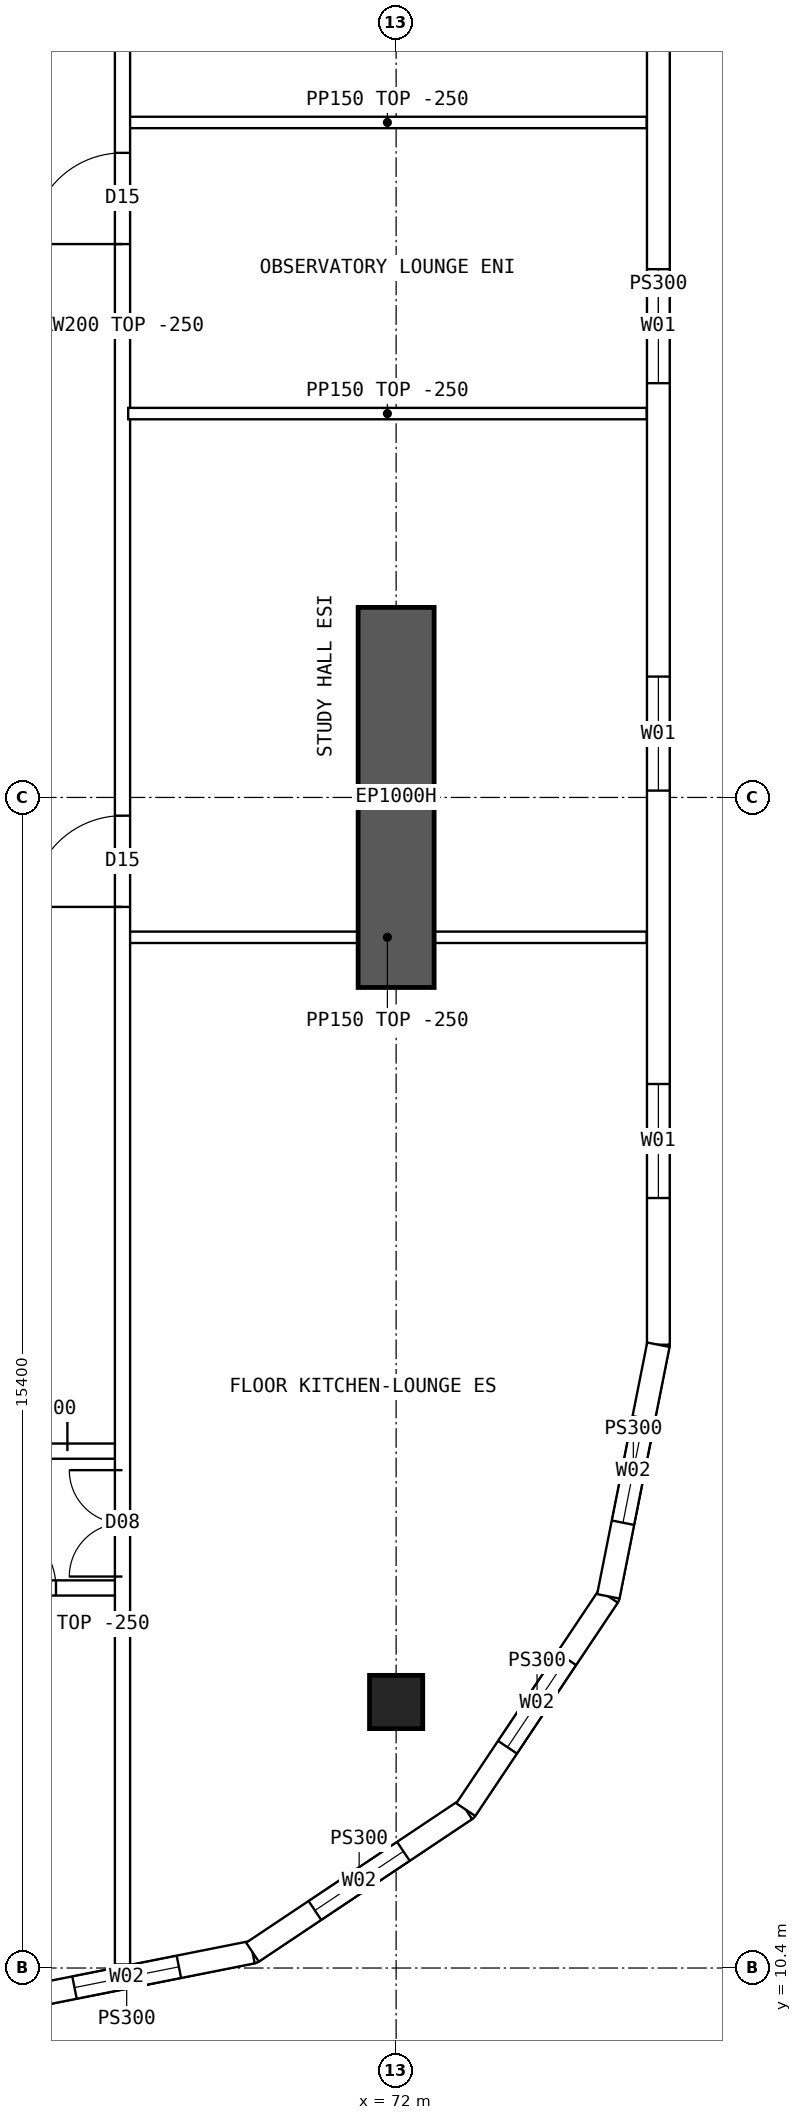
"""IFC4 building model, lengths in metres.
Left out: names, types, materials, properties, quantities, classifications, styles, units other than length and angle.
Written with IfcOpenShell. Run it as: python <this file> out.ifc"""

import sys

from ifc_helpers import new_model, si_unit, direction, frame, frame_2d, origin, origin_2d, place, context, subcontext, project, spatial, polyline, rectangle, hollow_rectangle, outline, extrude, element, fill, save


model = new_model("IFC4")
c1 = context("Model", 3, precision=1e-05, world=origin(), true_north=direction((0.0, 1.0)))
c2 = subcontext(c1, "Body", "Model", "MODEL_VIEW")
j1 = project(units=[si_unit("LENGTHUNIT", "METRE"), si_unit("PLANEANGLEUNIT", "RADIAN")], contexts=[c1])
p1 = place(None, origin())
s1 = spatial("IfcSite", under=j1, at=p1, CompositionType="ELEMENT")
p2 = place(p1, origin())
s2 = spatial("IfcBuilding", under=s1, at=p2, CompositionType="ELEMENT")
p3 = place(p2, frame((0.0, 0.0, 163.6)))
s3 = spatial("IfcBuildingStorey", under=s2, at=p3, CompositionType="ELEMENT", Elevation=163.6)
p4 = place(p3, frame((72.0, 13.9, 0.0), z_axis=(0.0, 0.0, 1.0), x_axis=(1.0, 0.0, 0.0)))
e1 = element("IfcColumn", 1, at=p4, inside=s3, PredefinedType="COLUMN", context=c2, shape_type="SweptSolid", body=[
    extrude(hollow_rectangle(XDim=0.7, YDim=0.7, WallThickness=0.07, at=origin_2d()), origin(), (0.0, 0.0, 1.0), 3.75),
])
p5 = place(p3, frame((72.0, 23.3, 0.0), z_axis=(0.0, 0.0, 1.0), x_axis=(0.0, 1.0, 0.0)))
e2 = element("IfcWall", 2, at=p5, inside=s3, PredefinedType="SHEAR", context=c2, shape_type="SweptSolid", body=[
    extrude(rectangle(XDim=5.0, YDim=1.0, at=frame_2d((2.5, 0.0))), origin(), (0.0, 0.0, 1.0), 3.75),
])
p6 = place(p3, frame((75.45, 18.6, 0.0), z_axis=(0.0, 0.0, 1.0), x_axis=(0.0, 1.0, 0.0)))
e3 = element("IfcWall", 3, at=p6, inside=s3, PredefinedType="SOLIDWALL", context=c2, shape_type="SweptSolid", body=[
    extrude(outline(polyline([(-0.015, -0.15), (26.815, -0.15), (26.785, 0.15), (0.015, 0.15), (-0.015, -0.15)])), origin(), (0.0, 0.0, 1.0), 3.5),
])
p7 = place(p6, frame((1.93, 0.0, 0.9)))
e4 = element("IfcOpeningElement", 4, at=p7, cuts=e3, PredefinedType="OPENING", context=c2, shape_type="SweptSolid", body=[
    extrude(rectangle(XDim=1.5, YDim=2.0, at=frame_2d((0.75, 1.0))), frame((0.0, 0.16, 0.0), z_axis=(0.0, -1.0, 0.0), x_axis=(1.0, 0.0, 0.0)), (0.0, 0.0, 1.0), 0.32),
])
p8 = place(p6, frame((7.29, 0.0, 0.9)))
e5 = element("IfcOpeningElement", 5, at=p8, cuts=e3, PredefinedType="OPENING", context=c2, shape_type="SweptSolid", body=[
    extrude(rectangle(XDim=1.5, YDim=2.0, at=frame_2d((0.75, 1.0))), frame((0.0, 0.16, 0.0), z_axis=(0.0, -1.0, 0.0), x_axis=(1.0, 0.0, 0.0)), (0.0, 0.0, 1.0), 0.32),
])
p9 = place(p6, frame((12.65, 0.0, 0.9)))
e6 = element("IfcOpeningElement", 6, at=p9, cuts=e3, PredefinedType="OPENING", context=c2, shape_type="SweptSolid", body=[
    extrude(rectangle(XDim=1.5, YDim=2.0, at=frame_2d((0.75, 1.0))), frame((0.0, 0.16, 0.0), z_axis=(0.0, -1.0, 0.0), x_axis=(1.0, 0.0, 0.0)), (0.0, 0.0, 1.0), 0.32),
])
p10 = place(p6, frame((18.01, 0.0, 0.9)))
e7 = element("IfcOpeningElement", 7, at=p10, cuts=e3, PredefinedType="OPENING", context=c2, shape_type="SweptSolid", body=[
    extrude(rectangle(XDim=1.5, YDim=2.0, at=frame_2d((0.75, 1.0))), frame((0.0, 0.16, 0.0), z_axis=(0.0, -1.0, 0.0), x_axis=(1.0, 0.0, 0.0)), (0.0, 0.0, 1.0), 0.32),
])
p11 = place(p6, frame((23.37, 0.0, 0.9)))
e8 = element("IfcOpeningElement", 8, at=p11, cuts=e3, PredefinedType="OPENING", context=c2, shape_type="SweptSolid", body=[
    extrude(rectangle(XDim=1.5, YDim=2.0, at=frame_2d((0.75, 1.0))), frame((0.0, 0.16, 0.0), z_axis=(0.0, -1.0, 0.0), x_axis=(1.0, 0.0, 0.0)), (0.0, 0.0, 1.0), 0.32),
])
p12 = place(p3, frame((66.8, 9.95, 0.0), z_axis=(0.0, 0.0, 1.0), x_axis=(0.98078325777, 0.195100490205, 0.0)))
e9 = element("IfcWall", 9, at=p12, inside=s3, PredefinedType="SOLIDWALL", context=c2, shape_type="SweptSolid", body=[
    extrude(outline(polyline([(-0.03, -0.15), (3.405, -0.15), (3.345, 0.15), (0.03, 0.15), (-0.03, -0.15)])), origin(), (0.0, 0.0, 1.0), 3.5),
])
p13 = place(p12, frame((0.988, 0.0, 0.9)))
e10 = element("IfcOpeningElement", 10, at=p13, cuts=e9, PredefinedType="OPENING", context=c2, shape_type="SweptSolid", body=[
    extrude(rectangle(XDim=1.4, YDim=1.8, at=frame_2d((0.7, 0.9))), frame((0.0, 0.16, 0.0), z_axis=(0.0, -1.0, 0.0), x_axis=(1.0, 0.0, 0.0)), (0.0, 0.0, 1.0), 0.32),
])
p14 = place(p3, frame((70.11, 10.608, 0.0), z_axis=(0.0, 0.0, 1.0), x_axis=(0.831493450887, 0.555534554399, 0.0)))
e11 = element("IfcWall", 11, at=p14, inside=s3, PredefinedType="SOLIDWALL", context=c2, shape_type="SweptSolid", body=[
    extrude(outline(polyline([(-0.03, -0.15), (3.405, -0.15), (3.345, 0.15), (0.03, 0.15), (-0.03, -0.15)])), origin(), (0.0, 0.0, 1.0), 3.5),
])
p15 = place(p14, frame((0.988, 0.0, 0.9)))
e12 = element("IfcOpeningElement", 12, at=p15, cuts=e11, PredefinedType="OPENING", context=c2, shape_type="SweptSolid", body=[
    extrude(rectangle(XDim=1.4, YDim=1.8, at=frame_2d((0.7, 0.9))), frame((0.0, 0.16, 0.0), z_axis=(0.0, -1.0, 0.0), x_axis=(1.0, 0.0, 0.0)), (0.0, 0.0, 1.0), 0.32),
])
p16 = place(p3, frame((72.917, 12.483, 0.0), z_axis=(0.0, 0.0, 1.0), x_axis=(0.555534554399, 0.831493450887, 0.0)))
e13 = element("IfcWall", 13, at=p16, inside=s3, PredefinedType="SOLIDWALL", context=c2, shape_type="SweptSolid", body=[
    extrude(outline(polyline([(-0.03, -0.15), (3.405, -0.15), (3.345, 0.15), (0.03, 0.15), (-0.03, -0.15)])), origin(), (0.0, 0.0, 1.0), 3.5),
])
p17 = place(p16, frame((0.988, 0.0, 0.9)))
e14 = element("IfcOpeningElement", 14, at=p17, cuts=e13, PredefinedType="OPENING", context=c2, shape_type="SweptSolid", body=[
    extrude(rectangle(XDim=1.4, YDim=1.8, at=frame_2d((0.7, 0.9))), frame((0.0, 0.16, 0.0), z_axis=(0.0, -1.0, 0.0), x_axis=(1.0, 0.0, 0.0)), (0.0, 0.0, 1.0), 0.32),
])
p18 = place(p3, frame((74.792, 15.29, 0.0), z_axis=(0.0, 0.0, 1.0), x_axis=(0.19508664885, 0.980786011034, 0.0)))
e15 = element("IfcWall", 15, at=p18, inside=s3, PredefinedType="SOLIDWALL", context=c2, shape_type="SweptSolid", body=[
    extrude(outline(polyline([(-0.03, -0.15), (3.39, -0.15), (3.36, 0.15), (0.03, 0.15), (-0.03, -0.15)])), origin(), (0.0, 0.0, 1.0), 3.5),
])
p19 = place(p18, frame((0.988, 0.0, 0.9)))
e16 = element("IfcOpeningElement", 16, at=p19, cuts=e15, PredefinedType="OPENING", context=c2, shape_type="SweptSolid", body=[
    extrude(rectangle(XDim=1.4, YDim=1.8, at=frame_2d((0.7, 0.9))), frame((0.0, 0.16, 0.0), z_axis=(0.0, -1.0, 0.0), x_axis=(1.0, 0.0, 0.0)), (0.0, 0.0, 1.0), 0.32),
])
p20 = place(p3, frame((66.425, 15.4, 0.0), z_axis=(0.0, 0.0, 1.0), x_axis=(1.0, 0.0, 0.0)))
e17 = element("IfcWall", 17, at=p20, inside=s3, PredefinedType="SOLIDWALL", context=c2, shape_type="SweptSolid", body=[
    extrude(rectangle(XDim=1.975, YDim=0.2, at=frame_2d((0.987, 0.0))), origin(), (0.0, 0.0, 1.0), 3.5),
])
p21 = place(p20, frame((0.2, 0.0, 0.0)))
e18 = element("IfcOpeningElement", 18, at=p21, cuts=e17, PredefinedType="OPENING", context=c2, shape_type="SweptSolid", body=[
    extrude(rectangle(XDim=0.9, YDim=2.1, at=frame_2d((0.45, 1.05))), frame((0.0, 0.11, 0.0), z_axis=(0.0, -1.0, 0.0), x_axis=(1.0, 0.0, 0.0)), (0.0, 0.0, 1.0), 0.22),
])
p22 = place(p3, frame((66.425, 17.2, 0.0), z_axis=(0.0, 0.0, 1.0), x_axis=(1.0, 0.0, 0.0)))
e19 = element("IfcWall", 19, at=p22, inside=s3, PredefinedType="SOLIDWALL", context=c2, shape_type="SweptSolid", body=[
    extrude(rectangle(XDim=1.975, YDim=0.2, at=frame_2d((0.987, 0.0))), origin(), (0.0, 0.0, 1.0), 3.5),
])
p23 = place(p22, frame((0.05, 0.0, 0.0)))
e20 = element("IfcOpeningElement", 20, at=p23, cuts=e19, PredefinedType="OPENING", context=c2, shape_type="SweptSolid", body=[
    extrude(rectangle(XDim=1.2, YDim=2.1, at=frame_2d((0.6, 1.05))), frame((0.0, 0.11, 0.0), z_axis=(0.0, -1.0, 0.0), x_axis=(1.0, 0.0, 0.0)), (0.0, 0.0, 1.0), 0.22),
])
p24 = place(p3, frame((68.475, 30.85, 0.0), z_axis=(0.0, 0.0, 1.0), x_axis=(1.0, 0.0, 0.0)))
e21 = element("IfcWall", 21, at=p24, inside=s3, PredefinedType="PARTITIONING", context=c2, shape_type="SweptSolid", body=[
    extrude(outline(polyline([(0.0, 0.0), (6.82, 0.0), (6.82, 3.5), (3.827, 3.5), (3.825, 3.05), (3.227, 3.05), (3.225, 3.5), (0.0, 3.5), (0.0, 0.0)])), frame((0.0, 0.075, 0.0), z_axis=(0.0, -1.0, 0.0), x_axis=(1.0, 0.0, 0.0)), (0.0, 0.0, 1.0), 0.15),
])
p25 = place(p3, frame((68.4, 10.446, 0.0), z_axis=(0.0, 0.0, 1.0), x_axis=(0.0, 1.0, 0.0)))
e22 = element("IfcWall", 22, at=p25, inside=s3, PredefinedType="SOLIDWALL", context=c2, shape_type="SweptSolid", body=[
    extrude(rectangle(XDim=43.107, YDim=0.2, at=frame_2d((21.554, 0.0))), origin(), (0.0, 0.0, 1.0), 3.5),
])
p26 = place(p25, frame((13.914, 0.0, 0.0)))
e23 = element("IfcOpeningElement", 23, at=p26, cuts=e22, PredefinedType="OPENING", context=c2, shape_type="SweptSolid", body=[
    extrude(rectangle(XDim=1.2, YDim=2.1, at=frame_2d((0.6, 1.05))), frame((0.0, 0.11, 0.0), z_axis=(0.0, -1.0, 0.0), x_axis=(1.0, 0.0, 0.0)), (0.0, 0.0, 1.0), 0.22),
])
p27 = place(p25, frame((22.634, 0.0, 0.0)))
e24 = element("IfcOpeningElement", 24, at=p27, cuts=e22, PredefinedType="OPENING", context=c2, shape_type="SweptSolid", body=[
    extrude(rectangle(XDim=1.2, YDim=2.1, at=frame_2d((0.6, 1.05))), frame((0.0, 0.11, 0.0), z_axis=(0.0, -1.0, 0.0), x_axis=(1.0, 0.0, 0.0)), (0.0, 0.0, 1.0), 0.22),
])
p28 = place(p25, frame((5.104, 0.0, 0.0)))
e25 = element("IfcOpeningElement", 25, at=p28, cuts=e22, PredefinedType="OPENING", context=c2, shape_type="SweptSolid", body=[
    extrude(rectangle(XDim=1.4, YDim=2.1, at=frame_2d((0.7, 1.05))), frame((0.0, 0.11, 0.0), z_axis=(0.0, -1.0, 0.0), x_axis=(1.0, 0.0, 0.0)), (0.0, 0.0, 1.0), 0.22),
])
p29 = place(p25, frame((36.504, 0.0, 0.0)))
e26 = element("IfcOpeningElement", 26, at=p29, cuts=e22, PredefinedType="OPENING", context=c2, shape_type="SweptSolid", body=[
    extrude(rectangle(XDim=1.4, YDim=2.1, at=frame_2d((0.7, 1.05))), frame((0.0, 0.11, 0.0), z_axis=(0.0, -1.0, 0.0), x_axis=(1.0, 0.0, 0.0)), (0.0, 0.0, 1.0), 0.22),
])
p30 = place(p3, frame((68.475, 23.96, 0.0), z_axis=(0.0, 0.0, 1.0), x_axis=(1.0, 0.0, 0.0)))
e27 = element("IfcWall", 27, at=p30, inside=s3, PredefinedType="PARTITIONING", context=c2, shape_type="SweptSolid", body=[
    extrude(rectangle(XDim=6.82, YDim=0.15, at=frame_2d((3.41, 0.0))), origin(), (0.0, 0.0, 1.0), 3.5),
])
p31 = place(p3, frame((68.475, 34.68, 0.0), z_axis=(0.0, 0.0, 1.0), x_axis=(1.0, 0.0, 0.0)))
e28 = element("IfcWall", 28, at=p31, inside=s3, PredefinedType="PARTITIONING", context=c2, shape_type="SweptSolid", body=[
    extrude(outline(polyline([(0.0, 0.0), (6.82, 0.0), (6.82, 3.5), (3.827, 3.5), (3.825, 3.05), (3.227, 3.05), (3.225, 3.5), (0.0, 3.5), (0.0, 0.0)])), frame((0.0, 0.075, 0.0), z_axis=(0.0, -1.0, 0.0), x_axis=(1.0, 0.0, 0.0)), (0.0, 0.0, 1.0), 0.15),
])
p32 = place(p7, origin())
e29 = element("IfcWindow", 29, at=p32, inside=s3, PartitioningType="SINGLE_PANEL", PredefinedType="WINDOW", context=c2, shape_type="SweptSolid", body=[
    extrude(rectangle(XDim=1.5, YDim=2.0, at=frame_2d((0.75, 1.0))), frame((0.0, 0.03, 0.0), z_axis=(0.0, -1.0, 0.0), x_axis=(1.0, 0.0, 0.0)), (0.0, 0.0, 1.0), 0.06),
])
fill(e4, e29)
p33 = place(p8, origin())
e30 = element("IfcWindow", 30, at=p33, inside=s3, PartitioningType="SINGLE_PANEL", PredefinedType="WINDOW", context=c2, shape_type="SweptSolid", body=[
    extrude(rectangle(XDim=1.5, YDim=2.0, at=frame_2d((0.75, 1.0))), frame((0.0, 0.03, 0.0), z_axis=(0.0, -1.0, 0.0), x_axis=(1.0, 0.0, 0.0)), (0.0, 0.0, 1.0), 0.06),
])
fill(e5, e30)
p34 = place(p9, origin())
e31 = element("IfcWindow", 31, at=p34, inside=s3, PartitioningType="SINGLE_PANEL", PredefinedType="WINDOW", context=c2, shape_type="SweptSolid", body=[
    extrude(rectangle(XDim=1.5, YDim=2.0, at=frame_2d((0.75, 1.0))), frame((0.0, 0.03, 0.0), z_axis=(0.0, -1.0, 0.0), x_axis=(1.0, 0.0, 0.0)), (0.0, 0.0, 1.0), 0.06),
])
fill(e6, e31)
p35 = place(p13, origin())
e32 = element("IfcWindow", 32, at=p35, inside=s3, PartitioningType="SINGLE_PANEL", PredefinedType="WINDOW", context=c2, shape_type="SweptSolid", body=[
    extrude(rectangle(XDim=1.4, YDim=1.8, at=frame_2d((0.7, 0.9))), frame((0.0, 0.03, 0.0), z_axis=(0.0, -1.0, 0.0), x_axis=(1.0, 0.0, 0.0)), (0.0, 0.0, 1.0), 0.06),
])
fill(e10, e32)
p36 = place(p15, origin())
e33 = element("IfcWindow", 33, at=p36, inside=s3, PartitioningType="SINGLE_PANEL", PredefinedType="WINDOW", context=c2, shape_type="SweptSolid", body=[
    extrude(rectangle(XDim=1.4, YDim=1.8, at=frame_2d((0.7, 0.9))), frame((0.0, 0.03, 0.0), z_axis=(0.0, -1.0, 0.0), x_axis=(1.0, 0.0, 0.0)), (0.0, 0.0, 1.0), 0.06),
])
fill(e12, e33)
p37 = place(p17, origin())
e34 = element("IfcWindow", 34, at=p37, inside=s3, PartitioningType="SINGLE_PANEL", PredefinedType="WINDOW", context=c2, shape_type="SweptSolid", body=[
    extrude(rectangle(XDim=1.4, YDim=1.8, at=frame_2d((0.7, 0.9))), frame((0.0, 0.03, 0.0), z_axis=(0.0, -1.0, 0.0), x_axis=(1.0, 0.0, 0.0)), (0.0, 0.0, 1.0), 0.06),
])
fill(e14, e34)
p38 = place(p19, origin())
e35 = element("IfcWindow", 35, at=p38, inside=s3, PartitioningType="SINGLE_PANEL", PredefinedType="WINDOW", context=c2, shape_type="SweptSolid", body=[
    extrude(rectangle(XDim=1.4, YDim=1.8, at=frame_2d((0.7, 0.9))), frame((0.0, 0.03, 0.0), z_axis=(0.0, -1.0, 0.0), x_axis=(1.0, 0.0, 0.0)), (0.0, 0.0, 1.0), 0.06),
])
fill(e16, e35)
p39 = place(p23, origin())
e36 = element("IfcDoor", 36, at=p39, inside=s3, OperationType="DOUBLE_DOOR_SINGLE_SWING", PredefinedType="DOOR", context=c2, shape_type="SweptSolid", body=[
    extrude(rectangle(XDim=1.2, YDim=2.1, at=frame_2d((0.6, 1.05))), frame((0.0, 0.025, 0.0), z_axis=(0.0, -1.0, 0.0), x_axis=(1.0, 0.0, 0.0)), (0.0, 0.0, 1.0), 0.05),
])
fill(e20, e36)
p40 = place(p26, origin())
e37 = element("IfcDoor", 37, at=p40, inside=s3, OperationType="SINGLE_SWING_LEFT", PredefinedType="DOOR", context=c2, shape_type="SweptSolid", body=[
    extrude(rectangle(XDim=1.2, YDim=2.1, at=frame_2d((0.6, 1.05))), frame((0.0, 0.025, 0.0), z_axis=(0.0, -1.0, 0.0), x_axis=(1.0, 0.0, 0.0)), (0.0, 0.0, 1.0), 0.05),
])
fill(e23, e37)
p41 = place(p27, origin())
e38 = element("IfcDoor", 38, at=p41, inside=s3, OperationType="SINGLE_SWING_LEFT", PredefinedType="DOOR", context=c2, shape_type="SweptSolid", body=[
    extrude(rectangle(XDim=1.2, YDim=2.1, at=frame_2d((0.6, 1.05))), frame((0.0, 0.025, 0.0), z_axis=(0.0, -1.0, 0.0), x_axis=(1.0, 0.0, 0.0)), (0.0, 0.0, 1.0), 0.05),
])
fill(e24, e38)
p42 = place(p28, origin())
e39 = element("IfcDoor", 39, at=p42, inside=s3, OperationType="DOUBLE_DOOR_SINGLE_SWING", PredefinedType="DOOR", context=c2, shape_type="SweptSolid", body=[
    extrude(rectangle(XDim=1.4, YDim=2.1, at=frame_2d((0.7, 1.05))), frame((0.0, 0.025, 0.0), z_axis=(0.0, -1.0, 0.0), x_axis=(1.0, 0.0, 0.0)), (0.0, 0.0, 1.0), 0.05),
])
fill(e25, e39)
p43 = place(p21, origin())
e40 = element("IfcDoor", 40, at=p43, inside=s3, OperationType="SINGLE_SWING_LEFT", PredefinedType="DOOR", context=c2, shape_type="SweptSolid", body=[
    extrude(rectangle(XDim=0.9, YDim=2.1, at=frame_2d((0.45, 1.05))), frame((0.0, 0.025, 0.0), z_axis=(0.0, -1.0, 0.0), x_axis=(1.0, 0.0, 0.0)), (0.0, 0.0, 1.0), 0.05),
])
fill(e18, e40)
save(model, sys.argv[1])
